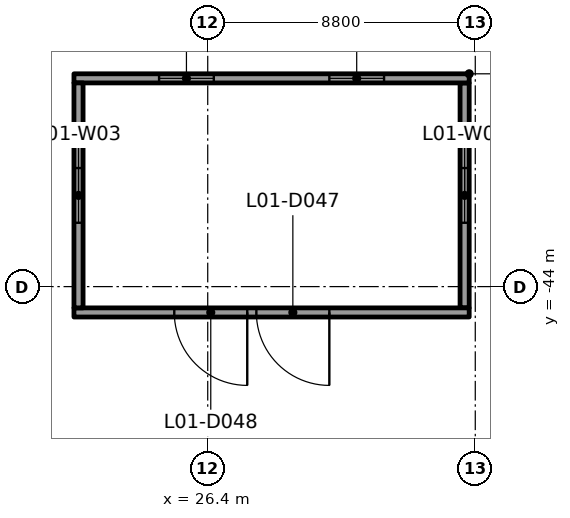
"""IFC4 building model, lengths in metres.
Left out: names, types, materials, properties, quantities, classifications, styles, units other than length and angle.
Written with IfcOpenShell. Run it as: python <this file> out.ifc"""

import sys

from ifc_helpers import new_model, si_unit, direction, frame, frame_2d, origin, place, context, subcontext, project, spatial, rectangle, extrude, element, fill, save


model = new_model("IFC4")
c1 = context("Model", 3, precision=1e-05, world=origin(), true_north=direction((0.0, 1.0)))
c2 = subcontext(c1, "Body", "Model", "MODEL_VIEW")
j1 = project(units=[si_unit("LENGTHUNIT", "METRE"), si_unit("PLANEANGLEUNIT", "RADIAN")], contexts=[c1])
p1 = place(None, origin())
s1 = spatial("IfcSite", under=j1, at=p1, CompositionType="ELEMENT")
p2 = place(p1, origin())
s2 = spatial("IfcBuilding", under=s1, at=p2, CompositionType="ELEMENT")
p3 = place(p2, frame((0.0, 0.0, 9.0)))
s3 = spatial("IfcBuildingStorey", under=s2, at=p3, CompositionType="ELEMENT", Elevation=9.0)
p4 = place(p3, frame((35.0, -44.85, -0.06), z_axis=(0.0, 0.0, 1.0), x_axis=(-1.0, 0.0, 0.0)))
e1 = element("IfcWall", 1, at=p4, inside=s3, PredefinedType="STANDARD", context=c2, shape_type="SweptSolid", body=[
    extrude(rectangle(XDim=13.0, YDim=0.3, at=frame_2d((6.5, 0.0))), origin(), (0.0, 0.0, 1.0), 4.56),
])
p5 = place(p4, frame((4.6, 0.0, 0.06)))
e2 = element("IfcOpeningElement", 2, at=p5, cuts=e1, PredefinedType="OPENING", context=c2, shape_type="SweptSolid", body=[
    extrude(rectangle(XDim=2.4, YDim=3.0, at=frame_2d((1.2, 1.5))), frame((0.0, 0.15, 0.0), z_axis=(0.0, -1.0, 0.0), x_axis=(1.0, 0.0, 0.0)), (0.0, 0.0, 1.0), 0.3),
])
p6 = place(p4, frame((7.3, 0.0, 0.06)))
e3 = element("IfcOpeningElement", 3, at=p6, cuts=e1, PredefinedType="OPENING", context=c2, shape_type="SweptSolid", body=[
    extrude(rectangle(XDim=2.4, YDim=3.0, at=frame_2d((1.2, 1.5))), frame((0.0, 0.15, 0.0), z_axis=(0.0, -1.0, 0.0), x_axis=(1.0, 0.0, 0.0)), (0.0, 0.0, 1.0), 0.3),
])
p7 = place(p3, frame((22.0, -37.15, -0.06), z_axis=(0.0, 0.0, 1.0), x_axis=(1.0, 0.0, 0.0)))
e4 = element("IfcWall", 4, at=p7, inside=s3, PredefinedType="STANDARD", context=c2, shape_type="SweptSolid", body=[
    extrude(rectangle(XDim=13.0, YDim=0.3, at=frame_2d((6.5, 0.0))), origin(), (0.0, 0.0, 1.0), 4.56),
])
p8 = place(p7, frame((2.8, 0.0, 0.46)))
e5 = element("IfcOpeningElement", 5, at=p8, cuts=e4, PredefinedType="OPENING", context=c2, shape_type="SweptSolid", body=[
    extrude(rectangle(XDim=1.8, YDim=2.4, at=frame_2d((0.9, 1.2))), frame((0.0, 0.15, 0.0), z_axis=(0.0, -1.0, 0.0), x_axis=(1.0, 0.0, 0.0)), (0.0, 0.0, 1.0), 0.3),
])
p9 = place(p7, frame((8.4, 0.0, 0.46)))
e6 = element("IfcOpeningElement", 6, at=p9, cuts=e4, PredefinedType="OPENING", context=c2, shape_type="SweptSolid", body=[
    extrude(rectangle(XDim=1.8, YDim=2.4, at=frame_2d((0.9, 1.2))), frame((0.0, 0.15, 0.0), z_axis=(0.0, -1.0, 0.0), x_axis=(1.0, 0.0, 0.0)), (0.0, 0.0, 1.0), 0.3),
])
p10 = place(p3, frame((22.15, -37.3, -0.06), z_axis=(0.0, 0.0, 1.0), x_axis=(0.0, -1.0, 0.0)))
e7 = element("IfcWall", 7, at=p10, inside=s3, PredefinedType="STANDARD", context=c2, shape_type="SweptSolid", body=[
    extrude(rectangle(XDim=7.4, YDim=0.3, at=frame_2d((3.7, 0.0))), origin(), (0.0, 0.0, 1.0), 4.56),
])
p11 = place(p10, frame((2.8, 0.0, 0.46)))
e8 = element("IfcOpeningElement", 8, at=p11, cuts=e7, PredefinedType="OPENING", context=c2, shape_type="SweptSolid", body=[
    extrude(rectangle(XDim=1.8, YDim=2.4, at=frame_2d((0.9, 1.2))), frame((0.0, 0.15, 0.0), z_axis=(0.0, -1.0, 0.0), x_axis=(1.0, 0.0, 0.0)), (0.0, 0.0, 1.0), 0.3),
])
p12 = place(p3, frame((34.85, -44.7, -0.06), z_axis=(0.0, 0.0, 1.0), x_axis=(0.0, 1.0, 0.0)))
e9 = element("IfcWall", 9, at=p12, inside=s3, PredefinedType="STANDARD", context=c2, shape_type="SweptSolid", body=[
    extrude(rectangle(XDim=7.4, YDim=0.3, at=frame_2d((3.7, 0.0))), origin(), (0.0, 0.0, 1.0), 4.56),
])
p13 = place(p12, frame((2.8, 0.0, 0.46)))
e10 = element("IfcOpeningElement", 10, at=p13, cuts=e9, PredefinedType="OPENING", context=c2, shape_type="SweptSolid", body=[
    extrude(rectangle(XDim=1.8, YDim=2.4, at=frame_2d((0.9, 1.2))), frame((0.0, 0.15, 0.0), z_axis=(0.0, -1.0, 0.0), x_axis=(1.0, 0.0, 0.0)), (0.0, 0.0, 1.0), 0.3),
])
p14 = place(p5, origin())
e11 = element("IfcDoor", 11, at=p14, inside=s3, OperationType="DOUBLE_DOOR_SINGLE_SWING", PredefinedType="DOOR", context=c2, shape_type="SweptSolid", body=[
    extrude(rectangle(XDim=2.4, YDim=3.0, at=frame_2d((1.2, 1.5))), frame((0.0, 0.025, 0.0), z_axis=(0.0, -1.0, 0.0), x_axis=(1.0, 0.0, 0.0)), (0.0, 0.0, 1.0), 0.05),
])
fill(e2, e11)
p15 = place(p6, origin())
e12 = element("IfcDoor", 12, at=p15, inside=s3, OperationType="DOUBLE_DOOR_SINGLE_SWING", PredefinedType="DOOR", context=c2, shape_type="SweptSolid", body=[
    extrude(rectangle(XDim=2.4, YDim=3.0, at=frame_2d((1.2, 1.5))), frame((0.0, 0.025, 0.0), z_axis=(0.0, -1.0, 0.0), x_axis=(1.0, 0.0, 0.0)), (0.0, 0.0, 1.0), 0.05),
])
fill(e3, e12)
p16 = place(p8, origin())
e13 = element("IfcWindow", 13, at=p16, inside=s3, PartitioningType="SINGLE_PANEL", PredefinedType="WINDOW", context=c2, shape_type="SweptSolid", body=[
    extrude(rectangle(XDim=1.8, YDim=2.4, at=frame_2d((0.9, 1.2))), frame((0.0, 0.03, 0.0), z_axis=(0.0, -1.0, 0.0), x_axis=(1.0, 0.0, 0.0)), (0.0, 0.0, 1.0), 0.06),
])
fill(e5, e13)
p17 = place(p9, origin())
e14 = element("IfcWindow", 14, at=p17, inside=s3, PartitioningType="SINGLE_PANEL", PredefinedType="WINDOW", context=c2, shape_type="SweptSolid", body=[
    extrude(rectangle(XDim=1.8, YDim=2.4, at=frame_2d((0.9, 1.2))), frame((0.0, 0.03, 0.0), z_axis=(0.0, -1.0, 0.0), x_axis=(1.0, 0.0, 0.0)), (0.0, 0.0, 1.0), 0.06),
])
fill(e6, e14)
p18 = place(p11, origin())
e15 = element("IfcWindow", 15, at=p18, inside=s3, PartitioningType="SINGLE_PANEL", PredefinedType="WINDOW", context=c2, shape_type="SweptSolid", body=[
    extrude(rectangle(XDim=1.8, YDim=2.4, at=frame_2d((0.9, 1.2))), frame((0.0, 0.03, 0.0), z_axis=(0.0, -1.0, 0.0), x_axis=(1.0, 0.0, 0.0)), (0.0, 0.0, 1.0), 0.06),
])
fill(e8, e15)
p19 = place(p13, origin())
e16 = element("IfcWindow", 16, at=p19, inside=s3, PartitioningType="SINGLE_PANEL", PredefinedType="WINDOW", context=c2, shape_type="SweptSolid", body=[
    extrude(rectangle(XDim=1.8, YDim=2.4, at=frame_2d((0.9, 1.2))), frame((0.0, 0.03, 0.0), z_axis=(0.0, -1.0, 0.0), x_axis=(1.0, 0.0, 0.0)), (0.0, 0.0, 1.0), 0.06),
])
fill(e10, e16)
save(model, sys.argv[1])
